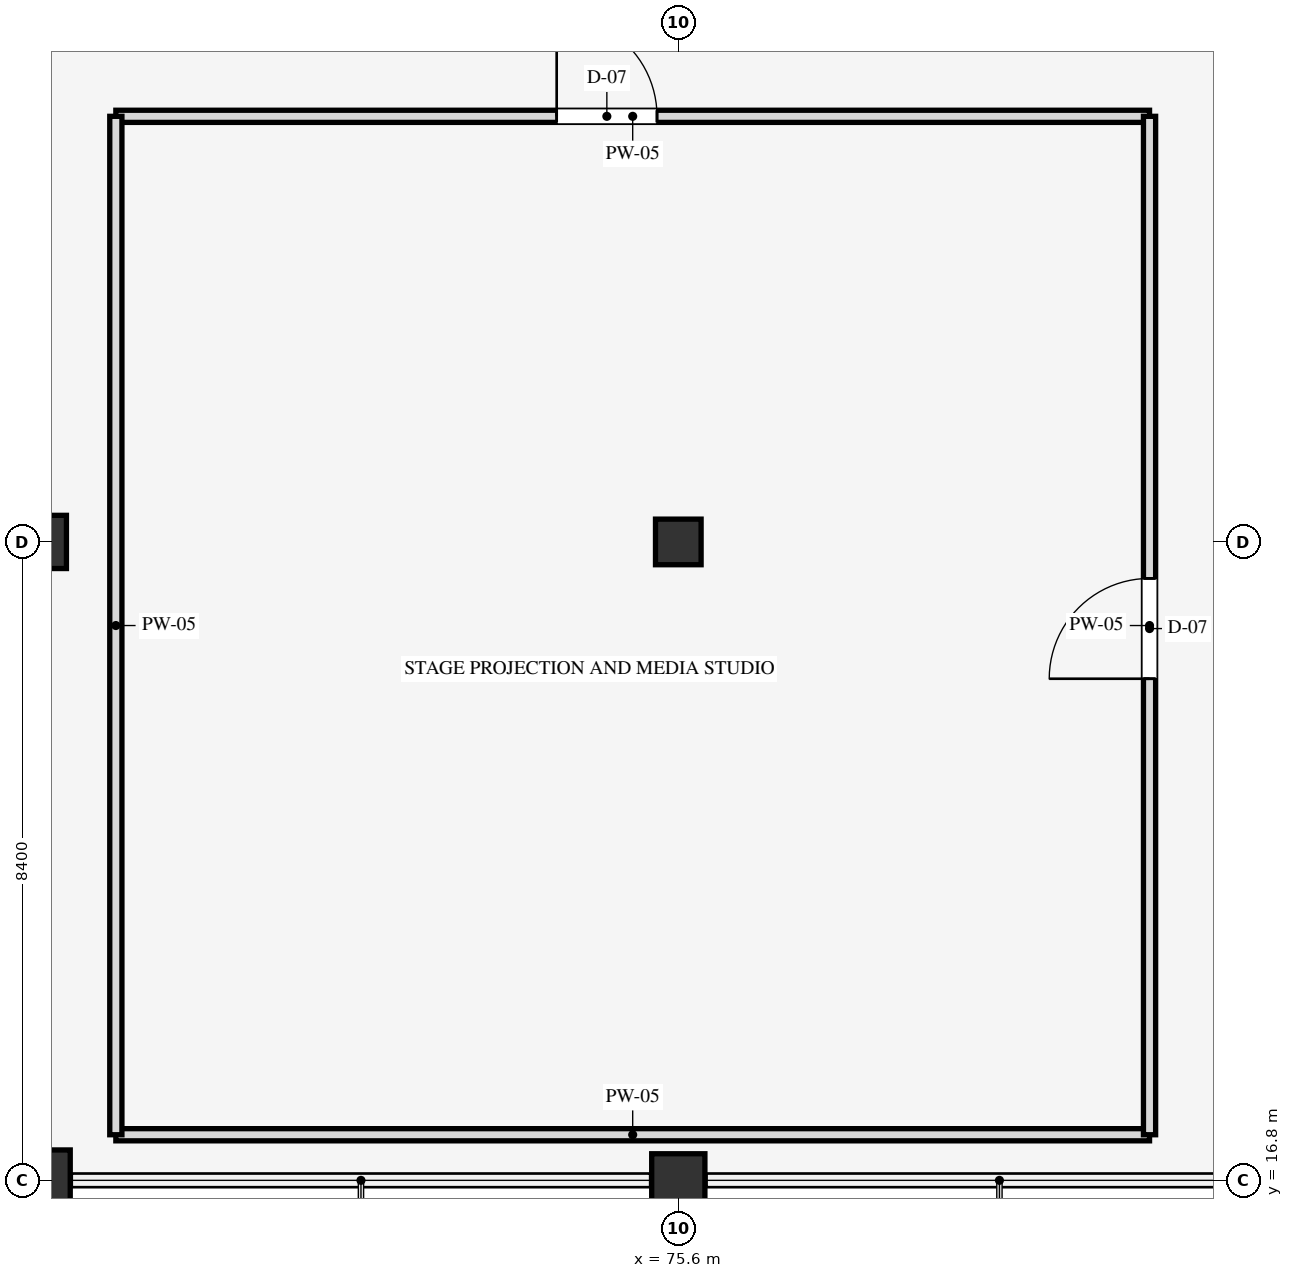
"""IFC4 building model, lengths in metres.
Left out: names, types, materials, properties, quantities, classifications, styles, units other than length and angle.
Written with IfcOpenShell. Run it as: python <this file> out.ifc"""

import sys

from ifc_helpers import new_model, si_unit, direction, frame, frame_2d, origin, origin_2d, place, context, subcontext, project, spatial, rectangle, extrude, element, fill, save


model = new_model("IFC4")
c1 = context("Model", 3, precision=1e-05, world=origin(), true_north=direction((0.0, 1.0)))
c2 = subcontext(c1, "Body", "Model", "MODEL_VIEW")
j1 = project(units=[si_unit("LENGTHUNIT", "METRE"), si_unit("PLANEANGLEUNIT", "RADIAN")], contexts=[c1])
p1 = place(None, origin())
s1 = spatial("IfcSite", under=j1, at=p1, CompositionType="ELEMENT")
p2 = place(p1, origin())
s2 = spatial("IfcBuilding", under=s1, at=p2, CompositionType="ELEMENT")
p3 = place(p2, frame((0.0, 0.0, 18.9)))
s3 = spatial("IfcBuildingStorey", under=s2, at=p3, CompositionType="ELEMENT", Elevation=18.9)
p4 = place(p3, frame((67.2, 16.8, 0.0), z_axis=(0.0, 0.0, 1.0), x_axis=(1.0, 0.0, 0.0)))
e1 = element("IfcColumn", 1, at=p4, inside=s3, PredefinedType="COLUMN", context=c2, shape_type="SweptSolid", body=[
    extrude(rectangle(XDim=0.8, YDim=0.8, at=origin_2d()), origin(), (0.0, 0.0, 1.0), 4.5),
])
for number, where, z_axis, x_axis in (
    (2, (67.2, 25.2, 0.0), (0.0, 0.0, 1.0), (1.0, 0.0, 0.0)),
    (3, (75.6, 16.8, 0.0), (0.0, 0.0, 1.0), (1.0, 0.0, 0.0)),
):
    element("IfcColumn", number, at=place(p3, frame(where, z_axis=z_axis, x_axis=x_axis)), inside=s3, PredefinedType="COLUMN", context=c2, shape_type="SweptSolid", body=[
        extrude(rectangle(XDim=0.7, YDim=0.7, at=origin_2d()), origin(), (0.0, 0.0, 1.0), 4.5),
    ])
p5 = place(p3, frame((75.6, 25.2, 0.0), z_axis=(0.0, 0.0, 1.0), x_axis=(1.0, 0.0, 0.0)))
e4 = element("IfcColumn", 4, at=p5, inside=s3, PredefinedType="COLUMN", context=c2, shape_type="SweptSolid", body=[
    extrude(rectangle(XDim=0.6, YDim=0.6, at=origin_2d()), origin(), (0.0, 0.0, 1.0), 4.5),
])
p6 = place(p3, frame((68.2, 17.4, 0.0), z_axis=(0.0, 0.0, 1.0), x_axis=(1.0, 0.0, 0.0)))
e5 = element("IfcWall", 5, at=p6, inside=s3, PredefinedType="PARTITIONING", context=c2, shape_type="SweptSolid", body=[
    extrude(rectangle(XDim=13.6, YDim=0.16, at=frame_2d((6.8, 0.0))), origin(), (0.0, 0.0, 1.0), 3.54),
])
p7 = place(p3, frame((68.2, 30.8, 0.0), z_axis=(0.0, 0.0, 1.0), x_axis=(1.0, 0.0, 0.0)))
e6 = element("IfcWall", 6, at=p7, inside=s3, PredefinedType="PARTITIONING", context=c2, shape_type="SweptSolid", body=[
    extrude(rectangle(XDim=13.6, YDim=0.16, at=frame_2d((6.8, 0.0))), origin(), (0.0, 0.0, 1.0), 3.54),
])
p8 = place(p7, frame((5.8, 0.0, 0.0)))
e7 = element("IfcOpeningElement", 7, at=p8, cuts=e6, PredefinedType="OPENING", context=c2, shape_type="SweptSolid", body=[
    extrude(rectangle(XDim=1.32, YDim=2.18, at=frame_2d((0.66, 1.09))), frame((0.0, 0.09, 0.0), z_axis=(0.0, -1.0, 0.0), x_axis=(1.0, 0.0, 0.0)), (0.0, 0.0, 1.0), 0.18),
])
p9 = place(p3, frame((68.2, 17.4, 0.0), z_axis=(0.0, 0.0, 1.0), x_axis=(0.0, 1.0, 0.0)))
e8 = element("IfcWall", 8, at=p9, inside=s3, PredefinedType="PARTITIONING", context=c2, shape_type="SweptSolid", body=[
    extrude(rectangle(XDim=13.4, YDim=0.16, at=frame_2d((6.7, 0.0))), origin(), (0.0, 0.0, 1.0), 3.54),
])
p10 = place(p3, frame((81.8, 17.4, 0.0), z_axis=(0.0, 0.0, 1.0), x_axis=(0.0, 1.0, 0.0)))
e9 = element("IfcWall", 9, at=p10, inside=s3, PredefinedType="PARTITIONING", context=c2, shape_type="SweptSolid", body=[
    extrude(rectangle(XDim=13.4, YDim=0.16, at=frame_2d((6.7, 0.0))), origin(), (0.0, 0.0, 1.0), 3.54),
])
p11 = place(p10, frame((6.0, 0.0, 0.0)))
e10 = element("IfcOpeningElement", 10, at=p11, cuts=e9, PredefinedType="OPENING", context=c2, shape_type="SweptSolid", body=[
    extrude(rectangle(XDim=1.32, YDim=2.18, at=frame_2d((0.66, 1.09))), frame((0.0, 0.09, 0.0), z_axis=(0.0, -1.0, 0.0), x_axis=(1.0, 0.0, 0.0)), (0.0, 0.0, 1.0), 0.18),
])
p12 = place(p8, origin())
e11 = element("IfcDoor", 11, at=p12, inside=s3, OperationType="SINGLE_SWING_LEFT", PredefinedType="DOOR", context=c2, shape_type="SweptSolid", body=[
    extrude(rectangle(XDim=1.32, YDim=2.18, at=frame_2d((0.66, 1.09))), frame((0.0, 0.025, 0.0), z_axis=(0.0, -1.0, 0.0), x_axis=(1.0, 0.0, 0.0)), (0.0, 0.0, 1.0), 0.05),
])
fill(e7, e11)
p13 = place(p11, origin())
e12 = element("IfcDoor", 12, at=p13, inside=s3, OperationType="SINGLE_SWING_LEFT", PredefinedType="DOOR", context=c2, shape_type="SweptSolid", body=[
    extrude(rectangle(XDim=1.32, YDim=2.18, at=frame_2d((0.66, 1.09))), frame((0.0, 0.025, 0.0), z_axis=(0.0, -1.0, 0.0), x_axis=(1.0, 0.0, 0.0)), (0.0, 0.0, 1.0), 0.05),
])
fill(e10, e12)
save(model, sys.argv[1])
